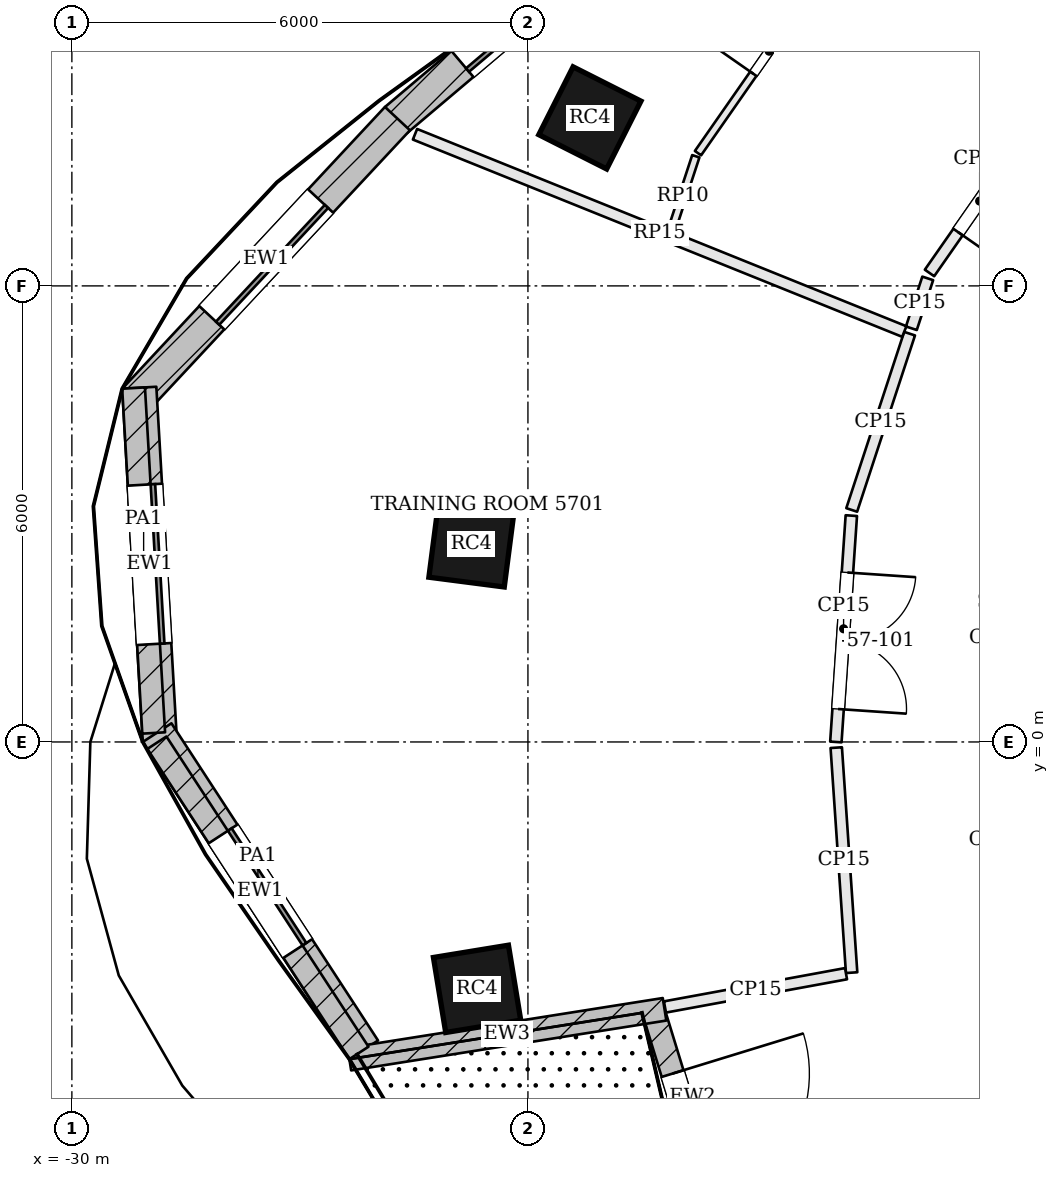
"""IFC4 building model, lengths in metres.
Left out: names, types, materials, properties, quantities, classifications, styles, units other than length and angle.
Written with IfcOpenShell. Run it as: python <this file> out.ifc"""

import sys

from ifc_helpers import new_model, si_unit, direction, frame, frame_2d, origin, origin_2d, place, context, subcontext, project, spatial, rectangle, extrude, element, fill, save


model = new_model("IFC4")
c1 = context("Model", 3, precision=1e-05, world=origin(), true_north=direction((0.0, 1.0)))
c2 = subcontext(c1, "Body", "Model", "MODEL_VIEW")
j1 = project(units=[si_unit("LENGTHUNIT", "METRE"), si_unit("PLANEANGLEUNIT", "RADIAN")], contexts=[c1])
p1 = place(None, origin())
s1 = spatial("IfcSite", under=j1, at=p1, CompositionType="ELEMENT")
p2 = place(p1, origin())
s2 = spatial("IfcBuilding", under=s1, at=p2, CompositionType="ELEMENT")
p3 = place(p2, frame((0.0, 0.0, 233.1)))
s3 = spatial("IfcBuildingStorey", under=s2, at=p3, CompositionType="ELEMENT", Elevation=233.1)
for number, where, z_axis, x_axis in (
    (1, (-23.185, 8.21, 0.0), (0.0, 0.0, 1.0), (-0.451, -0.893, 0.0)),
    (2, (-24.743, 2.599, 0.0), (0.0, 0.0, 1.0), (-0.128, -0.992, 0.0)),
    (3, (-24.669, -3.248, 0.0), (0.0, 0.0, 1.0), (0.162, -0.987, 0.0)),
):
    element("IfcColumn", number, at=place(p3, frame(where, z_axis=z_axis, x_axis=x_axis)), inside=s3, PredefinedType="COLUMN", context=c2, shape_type="SweptSolid", body=[
        extrude(rectangle(XDim=1.0, YDim=1.0, at=origin_2d()), origin(), (0.0, 0.0, 1.0), 3.9),
    ])
p4 = place(p3, frame((-22.386, 11.014, 0.0), z_axis=(0.0, 0.0, 1.0), x_axis=(-0.763569952162, -0.645725118108, 0.0)))
e4 = element("IfcWall", 4, at=p4, inside=s3, PredefinedType="SOLIDWALL", context=c2, shape_type="SweptSolid", body=[
    extrude(rectangle(XDim=4.386, YDim=0.45, at=frame_2d((2.193, 0.0))), origin(), (0.0, 0.0, 1.0), 3.7),
])
p5 = place(p4, frame((1.143, 0.0, 0.9)))
e5 = element("IfcOpeningElement", 5, at=p5, cuts=e4, PredefinedType="OPENING", context=c2, shape_type="SweptSolid", body=[
    extrude(rectangle(XDim=2.1, YDim=2.3, at=frame_2d((1.05, 1.15))), frame((0.0, 0.235, 0.0), z_axis=(0.0, -1.0, 0.0), x_axis=(1.0, 0.0, 0.0)), (0.0, 0.0, 1.0), 0.47),
])
p6 = place(p3, frame((-25.717, 8.201, 0.0), z_axis=(0.0, 0.0, 1.0), x_axis=(-0.681990073025, -0.731361429319, 0.0)))
e6 = element("IfcWall", 6, at=p6, inside=s3, PredefinedType="SOLIDWALL", context=c2, shape_type="SweptSolid", body=[
    extrude(rectangle(XDim=5.064, YDim=0.45, at=frame_2d((2.532, 0.0))), origin(), (0.0, 0.0, 1.0), 3.7),
])
p7 = place(p6, frame((1.482, 0.0, 0.9)))
e7 = element("IfcOpeningElement", 7, at=p7, cuts=e6, PredefinedType="OPENING", context=c2, shape_type="SweptSolid", body=[
    extrude(rectangle(XDim=2.1, YDim=2.3, at=frame_2d((1.05, 1.15))), frame((0.0, 0.235, 0.0), z_axis=(0.0, -1.0, 0.0), x_axis=(1.0, 0.0, 0.0)), (0.0, 0.0, 1.0), 0.47),
])
p8 = place(p3, frame((-29.113, 4.66, 0.0), z_axis=(0.0, 0.0, 1.0), x_axis=(0.058217785859, -0.998303906338, 0.0)))
e8 = element("IfcWall", 8, at=p8, inside=s3, PredefinedType="SOLIDWALL", context=c2, shape_type="SweptSolid", body=[
    extrude(rectangle(XDim=4.655, YDim=0.45, at=frame_2d((2.327, 0.0))), origin(), (0.0, 0.0, 1.0), 3.7),
])
p9 = place(p8, frame((1.277, 0.0, 0.9)))
e9 = element("IfcOpeningElement", 9, at=p9, cuts=e8, PredefinedType="OPENING", context=c2, shape_type="SweptSolid", body=[
    extrude(rectangle(XDim=2.1, YDim=2.3, at=frame_2d((1.05, 1.15))), frame((0.0, 0.235, 0.0), z_axis=(0.0, -1.0, 0.0), x_axis=(1.0, 0.0, 0.0)), (0.0, 0.0, 1.0), 0.47),
])
p10 = place(p3, frame((-28.878, 0.123, 0.0), z_axis=(0.0, 0.0, 1.0), x_axis=(0.545765236226, -0.837938128341, 0.0)))
e10 = element("IfcWall", 10, at=p10, inside=s3, PredefinedType="SOLIDWALL", context=c2, shape_type="SweptSolid", body=[
    extrude(rectangle(XDim=4.98, YDim=0.45, at=frame_2d((2.49, 0.0))), origin(), (0.0, 0.0, 1.0), 3.7),
])
p11 = place(p10, frame((1.59, 0.0, 0.9)))
e11 = element("IfcOpeningElement", 11, at=p11, cuts=e10, PredefinedType="OPENING", context=c2, shape_type="SweptSolid", body=[
    extrude(rectangle(XDim=1.8, YDim=2.3, at=frame_2d((0.9, 1.15))), frame((0.0, 0.235, 0.0), z_axis=(0.0, -1.0, 0.0), x_axis=(1.0, 0.0, 0.0)), (0.0, 0.0, 1.0), 0.47),
])
p12 = place(p3, frame((-22.356, -3.52, 0.0), z_axis=(0.0, 0.0, 1.0), x_axis=(0.293609133774, -0.955925560159, 0.0)))
e12 = element("IfcWall", 12, at=p12, inside=s3, PredefinedType="SOLIDWALL", context=c2, shape_type="SweptSolid", body=[
    extrude(rectangle(XDim=3.563, YDim=0.3, at=frame_2d((1.781, 0.0))), origin(), (0.0, 0.0, 1.0), 3.7),
])
p13 = place(p12, frame((0.882, 0.0, 0.0)))
e13 = element("IfcOpeningElement", 13, at=p13, cuts=e12, PredefinedType="OPENING", context=c2, shape_type="SweptSolid", body=[
    extrude(rectangle(XDim=1.8, YDim=2.4, at=frame_2d((0.9, 1.2))), frame((0.0, 0.16, 0.0), z_axis=(0.0, -1.0, 0.0), x_axis=(1.0, 0.0, 0.0)), (0.0, 0.0, 1.0), 0.32),
])
p14 = place(p3, frame((-26.349, -4.173, 0.0), z_axis=(0.0, 0.0, 1.0), x_axis=(0.987715294528, 0.156264189614, 0.0)))
e14 = element("IfcWall", 14, at=p14, inside=s3, PredefinedType="SOLIDWALL", context=c2, shape_type="SweptSolid", body=[
    extrude(rectangle(XDim=4.198, YDim=0.3, at=frame_2d((2.099, 0.0))), origin(), (0.0, 0.0, 1.0), 3.254),
])
p15 = place(p3, frame((-29.188, 4.656, 3.9), z_axis=(0.0, 0.0, 1.0), x_axis=(0.058224524291, -0.998303513352, 0.0)))
e15 = element("IfcWall", 15, at=p15, inside=s3, PredefinedType="PARAPET", context=c2, shape_type="SweptSolid", body=[
    extrude(rectangle(XDim=4.545, YDim=0.3, at=frame_2d((2.273, 0.0))), origin(), (0.0, 0.0, 1.0), 1.1),
])
p16 = place(p3, frame((-28.882, -0.01, 3.9), z_axis=(0.0, 0.0, 1.0), x_axis=(0.545784501078, -0.837925580457, 0.0)))
e16 = element("IfcWall", 16, at=p16, inside=s3, PredefinedType="PARAPET", context=c2, shape_type="SweptSolid", body=[
    extrude(rectangle(XDim=4.87, YDim=0.3, at=frame_2d((2.435, 0.0))), origin(), (0.0, 0.0, 1.0), 1.1),
])
p17 = place(p3, frame((-18.979, 5.372, 0.0), z_axis=(0.0, 0.0, 1.0), x_axis=(-0.311873415846, -0.950123661682, 0.0)))
e17 = element("IfcWall", 17, at=p17, inside=s3, PredefinedType="PARTITIONING", context=c2, shape_type="SweptSolid", body=[
    extrude(rectangle(XDim=2.441, YDim=0.15, at=frame_2d((1.22, 0.0))), origin(), (0.0, 0.0, 1.0), 3.084),
])
p18 = place(p3, frame((-19.745, 2.978, 0.0), z_axis=(0.0, 0.0, 1.0), x_axis=(-0.068142324, -0.997675610447, 0.0)))
e18 = element("IfcWall", 18, at=p18, inside=s3, PredefinedType="PARTITIONING", context=c2, shape_type="SweptSolid", body=[
    extrude(rectangle(XDim=2.984, YDim=0.15, at=frame_2d((1.492, 0.0))), origin(), (0.0, 0.0, 1.0), 3.084),
])
p19 = place(p18, frame((0.75, 0.0, 0.0)))
e19 = element("IfcOpeningElement", 19, at=p19, cuts=e18, PredefinedType="OPENING", context=c2, shape_type="SweptSolid", body=[
    extrude(rectangle(XDim=1.8, YDim=2.1, at=frame_2d((0.9, 1.05))), frame((0.0, 0.085, 0.0), z_axis=(0.0, -1.0, 0.0), x_axis=(1.0, 0.0, 0.0)), (0.0, 0.0, 1.0), 0.17),
])
p20 = place(p3, frame((-19.944, -0.075, 0.0), z_axis=(0.0, 0.0, 1.0), x_axis=(0.068124395451, -0.997676834824, 0.0)))
e20 = element("IfcWall", 20, at=p20, inside=s3, PredefinedType="PARTITIONING", context=c2, shape_type="SweptSolid", body=[
    extrude(rectangle(XDim=2.967, YDim=0.15, at=frame_2d((1.484, 0.0))), origin(), (0.0, 0.0, 1.0), 3.084),
])
p21 = place(p3, frame((-25.486, 7.995, 0.0), z_axis=(0.0, 0.0, 1.0), x_axis=(0.927464099257, -0.373912215083, 0.0)))
e21 = element("IfcWall", 21, at=p21, inside=s3, PredefinedType="PARTITIONING", context=c2, shape_type="SweptSolid", body=[
    extrude(rectangle(XDim=6.941, YDim=0.15, at=frame_2d((3.47, 0.0))), origin(), (0.0, 0.0, 1.0), 3.084),
])
p22 = place(p3, frame((-22.198, -3.487, 0.0), z_axis=(0.0, 0.0, 1.0), x_axis=(0.983516451856, 0.18081866311, 0.0)))
e22 = element("IfcWall", 22, at=p22, inside=s3, PredefinedType="PARTITIONING", context=c2, shape_type="SweptSolid", body=[
    extrude(rectangle(XDim=2.422, YDim=0.15, at=frame_2d((1.211, 0.0))), origin(), (0.0, 0.0, 1.0), 3.084),
])
p23 = place(p3, frame((-17.397, 8.062, 0.0), z_axis=(0.0, 0.0, 1.0), x_axis=(-0.572118665737, -0.820170855563, 0.0)))
e23 = element("IfcWall", 23, at=p23, inside=s3, PredefinedType="PARTITIONING", context=c2, shape_type="SweptSolid", body=[
    extrude(rectangle(XDim=2.306, YDim=0.15, at=frame_2d((1.153, 0.0))), origin(), (0.0, 0.0, 1.0), 3.084),
])
p24 = place(p23, frame((0.65, 0.0, 0.0)))
e24 = element("IfcOpeningElement", 24, at=p24, cuts=e23, PredefinedType="OPENING", context=c2, shape_type="SweptSolid", body=[
    extrude(rectangle(XDim=1.0, YDim=2.1, at=frame_2d((0.5, 1.05))), frame((0.0, 0.085, 0.0), z_axis=(0.0, -1.0, 0.0), x_axis=(1.0, 0.0, 0.0)), (0.0, 0.0, 1.0), 0.17),
])
p25 = place(p3, frame((-18.74, 6.099, 0.0), z_axis=(0.0, 0.0, 1.0), x_axis=(-0.311875163268, -0.950123088098, 0.0)))
e25 = element("IfcWall", 25, at=p25, inside=s3, PredefinedType="PARTITIONING", context=c2, shape_type="SweptSolid", body=[
    extrude(rectangle(XDim=0.69, YDim=0.15, at=frame_2d((0.345, 0.0))), origin(), (0.0, 0.0, 1.0), 3.084),
])
p26 = place(p3, frame((-22.133, 6.665, 0.0), z_axis=(0.0, 0.0, 1.0), x_axis=(0.311877335249, 0.950122375148, 0.0)))
e26 = element("IfcWall", 26, at=p26, inside=s3, PredefinedType="PARTITIONING", context=c2, shape_type="SweptSolid", body=[
    extrude(rectangle(XDim=1.095, YDim=0.1, at=frame_2d((0.548, 0.0))), origin(), (0.0, 0.0, 1.0), 3.084),
])
p27 = place(p3, frame((-21.763, 7.746, 0.0), z_axis=(0.0, 0.0, 1.0), x_axis=(0.57207420081, 0.820201870741, 0.0)))
e27 = element("IfcWall", 27, at=p27, inside=s3, PredefinedType="PARTITIONING", context=c2, shape_type="SweptSolid", body=[
    extrude(rectangle(XDim=3.271, YDim=0.1, at=frame_2d((1.636, 0.0))), origin(), (0.0, 0.0, 1.0), 3.084),
])
p28 = place(p27, frame((1.273, 0.0, 0.0)))
e28 = element("IfcOpeningElement", 28, at=p28, cuts=e27, PredefinedType="OPENING", context=c2, shape_type="SweptSolid", body=[
    extrude(rectangle(XDim=0.9, YDim=2.1, at=frame_2d((0.45, 1.05))), frame((0.0, 0.06, 0.0), z_axis=(0.0, -1.0, 0.0), x_axis=(1.0, 0.0, 0.0)), (0.0, 0.0, 1.0), 0.12),
])
p29 = place(p5, origin())
e29 = element("IfcWindow", 29, at=p29, inside=s3, PartitioningType="SINGLE_PANEL", PredefinedType="WINDOW", context=c2, shape_type="SweptSolid", body=[
    extrude(rectangle(XDim=2.1, YDim=2.3, at=frame_2d((1.05, 1.15))), frame((0.0, 0.135, 0.0), z_axis=(0.0, -1.0, 0.0), x_axis=(1.0, 0.0, 0.0)), (0.0, 0.0, 1.0), 0.06),
])
fill(e5, e29)
p30 = place(p7, origin())
e30 = element("IfcWindow", 30, at=p30, inside=s3, PartitioningType="SINGLE_PANEL", PredefinedType="WINDOW", context=c2, shape_type="SweptSolid", body=[
    extrude(rectangle(XDim=2.1, YDim=2.3, at=frame_2d((1.05, 1.15))), frame((0.0, 0.135, 0.0), z_axis=(0.0, -1.0, 0.0), x_axis=(1.0, 0.0, 0.0)), (0.0, 0.0, 1.0), 0.06),
])
fill(e7, e30)
p31 = place(p9, origin())
e31 = element("IfcWindow", 31, at=p31, inside=s3, PartitioningType="SINGLE_PANEL", PredefinedType="WINDOW", context=c2, shape_type="SweptSolid", body=[
    extrude(rectangle(XDim=2.1, YDim=2.3, at=frame_2d((1.05, 1.15))), frame((0.0, 0.135, 0.0), z_axis=(0.0, -1.0, 0.0), x_axis=(1.0, 0.0, 0.0)), (0.0, 0.0, 1.0), 0.06),
])
fill(e9, e31)
p32 = place(p11, origin())
e32 = element("IfcWindow", 32, at=p32, inside=s3, PartitioningType="SINGLE_PANEL", PredefinedType="WINDOW", context=c2, shape_type="SweptSolid", body=[
    extrude(rectangle(XDim=1.8, YDim=2.3, at=frame_2d((0.9, 1.15))), frame((0.0, 0.135, 0.0), z_axis=(0.0, -1.0, 0.0), x_axis=(1.0, 0.0, 0.0)), (0.0, 0.0, 1.0), 0.06),
])
fill(e11, e32)
p33 = place(p13, origin())
e33 = element("IfcDoor", 33, at=p33, inside=s3, OperationType="DOUBLE_DOOR_DOUBLE_SWING", PredefinedType="DOOR", context=c2, shape_type="SweptSolid", body=[
    extrude(rectangle(XDim=1.8, YDim=2.4, at=frame_2d((0.9, 1.2))), frame((0.0, 0.025, 0.0), z_axis=(0.0, -1.0, 0.0), x_axis=(1.0, 0.0, 0.0)), (0.0, 0.0, 1.0), 0.05),
])
fill(e13, e33)
p34 = place(p19, origin())
e34 = element("IfcDoor", 34, at=p34, inside=s3, OperationType="DOUBLE_DOOR_SINGLE_SWING", PredefinedType="DOOR", context=c2, shape_type="SweptSolid", body=[
    extrude(rectangle(XDim=1.8, YDim=2.1, at=frame_2d((0.9, 1.05))), frame((0.0, 0.025, 0.0), z_axis=(0.0, -1.0, 0.0), x_axis=(1.0, 0.0, 0.0)), (0.0, 0.0, 1.0), 0.05),
])
fill(e19, e34)
p35 = place(p28, origin())
e35 = element("IfcDoor", 35, at=p35, inside=s3, OperationType="SINGLE_SWING_LEFT", PredefinedType="DOOR", context=c2, shape_type="SweptSolid", body=[
    extrude(rectangle(XDim=0.9, YDim=2.1, at=frame_2d((0.45, 1.05))), frame((0.0, 0.025, 0.0), z_axis=(0.0, -1.0, 0.0), x_axis=(1.0, 0.0, 0.0)), (0.0, 0.0, 1.0), 0.05),
])
fill(e28, e35)
p36 = place(p24, origin())
e36 = element("IfcDoor", 36, at=p36, inside=s3, OperationType="SINGLE_SWING_RIGHT", PredefinedType="DOOR", context=c2, shape_type="SweptSolid", body=[
    extrude(rectangle(XDim=1.0, YDim=2.1, at=frame_2d((0.5, 1.05))), frame((0.0, 0.025, 0.0), z_axis=(0.0, -1.0, 0.0), x_axis=(1.0, 0.0, 0.0)), (0.0, 0.0, 1.0), 0.05),
])
fill(e24, e36)
save(model, sys.argv[1])
